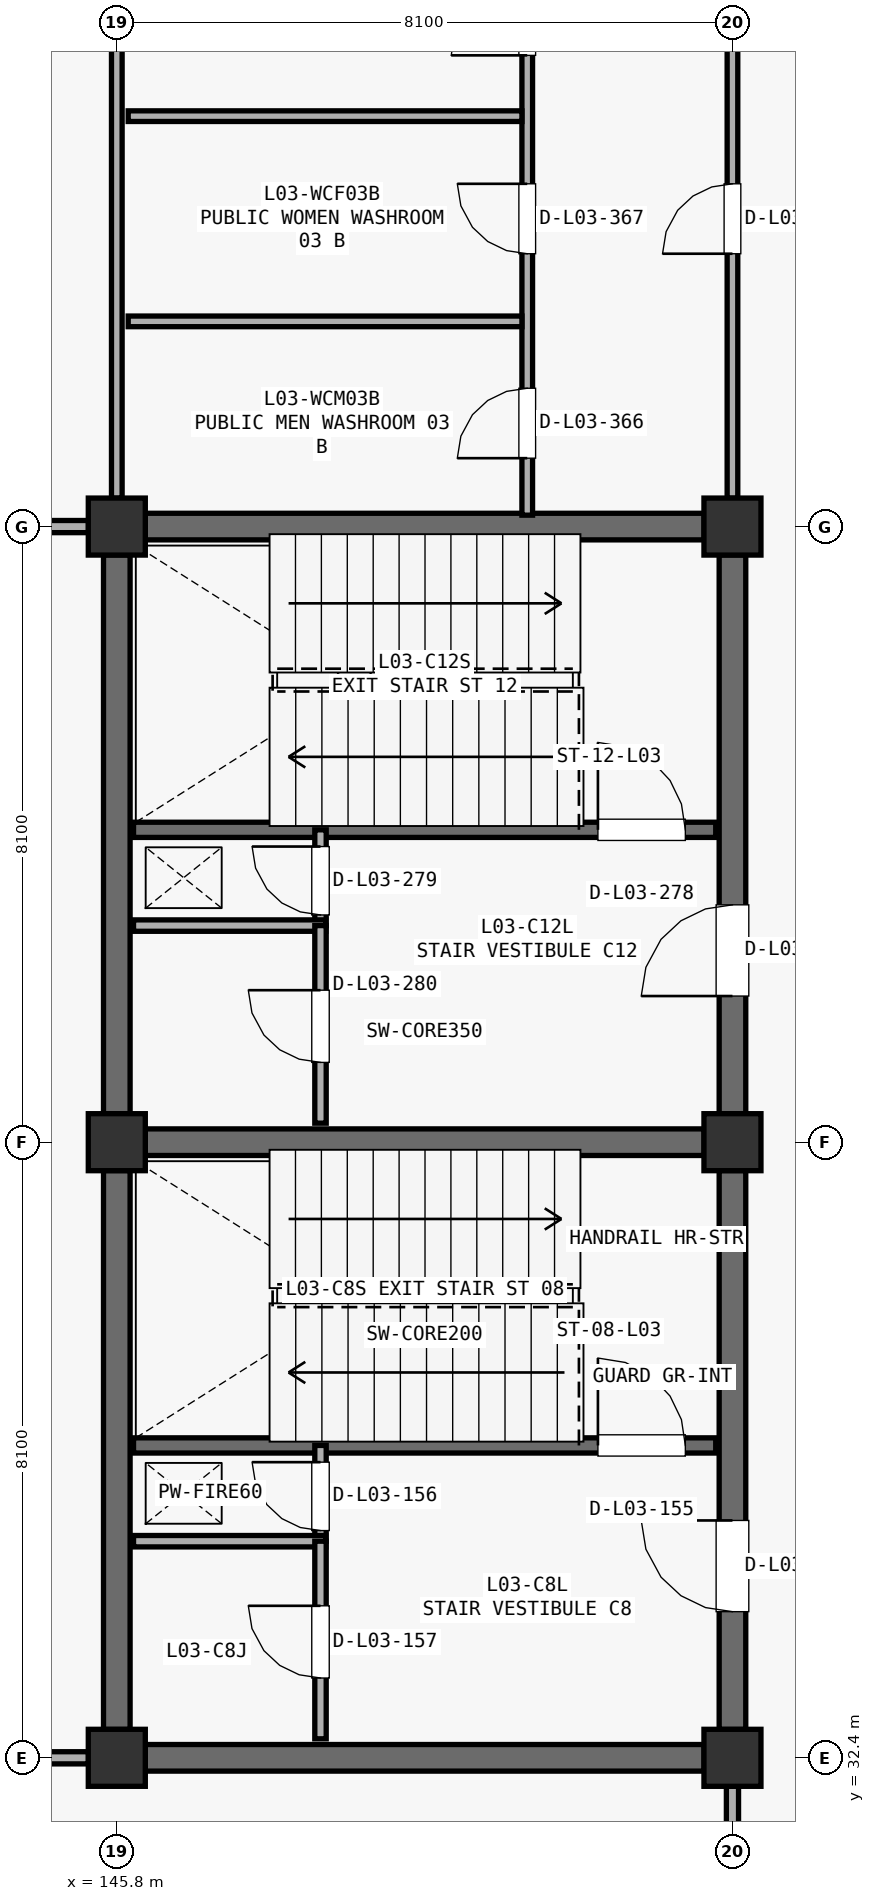
"""IFC4 building model, lengths in metres.
Left out: names, types, materials, properties, quantities, classifications, styles, units other than length and angle.
Written with IfcOpenShell. Run it as: python <this file> out.ifc"""

import sys

from ifc_helpers import new_model, si_unit, direction, frame, frame_2d, origin, origin_2d, place, context, subcontext, project, spatial, rectangle, extrude, element, fill, save


model = new_model("IFC4")
c1 = context("Model", 3, precision=1e-05, world=origin(), true_north=direction((0.0, 1.0)))
c2 = subcontext(c1, "Body", "Model", "MODEL_VIEW")
j1 = project(units=[si_unit("LENGTHUNIT", "METRE"), si_unit("PLANEANGLEUNIT", "RADIAN")], contexts=[c1])
p1 = place(None, origin())
s1 = spatial("IfcSite", under=j1, at=p1, CompositionType="ELEMENT")
p2 = place(p1, origin())
s2 = spatial("IfcBuilding", under=s1, at=p2, CompositionType="ELEMENT")
p3 = place(p2, frame((0.0, 0.0, 14.11)))
s3 = spatial("IfcBuildingStorey", under=s2, at=p3, CompositionType="ELEMENT", Elevation=14.11)
for number, where, z_axis, x_axis in (
    (1, (145.8, 32.4, 0.0), (0.0, 0.0, 1.0), (1.0, 0.0, 0.0)),
    (2, (145.8, 40.5, 0.0), (0.0, 0.0, 1.0), (1.0, 0.0, 0.0)),
    (3, (145.8, 48.6, 0.0), (0.0, 0.0, 1.0), (1.0, 0.0, 0.0)),
    (4, (153.9, 32.4, 0.0), (0.0, 0.0, 1.0), (1.0, 0.0, 0.0)),
    (5, (153.9, 40.5, 0.0), (0.0, 0.0, 1.0), (1.0, 0.0, 0.0)),
    (6, (153.9, 48.6, 0.0), (0.0, 0.0, 1.0), (1.0, 0.0, 0.0)),
):
    element("IfcColumn", number, at=place(p3, frame(where, z_axis=z_axis, x_axis=x_axis)), inside=s3, PredefinedType="COLUMN", context=c2, shape_type="SweptSolid", body=[
        extrude(rectangle(XDim=0.75, YDim=0.75, at=origin_2d()), origin(), (0.0, 0.0, 1.0), 4.42),
    ])
for number, where, z_axis, x_axis in (
    (7, (146.173, 40.5, 0.0), (0.0, 0.0, 1.0), (1.0, 0.0, 0.0)),
    (8, (145.8, 32.773, 0.0), (0.0, 0.0, 1.0), (0.0, 1.0, 0.0)),
):
    element("IfcWall", number, at=place(p3, frame(where, z_axis=z_axis, x_axis=x_axis)), inside=s3, PredefinedType="SHEAR", context=c2, shape_type="SweptSolid", body=[
        extrude(rectangle(XDim=7.354, YDim=0.35, at=frame_2d((3.677, 0.0))), origin(), (0.0, 0.0, 1.0), 4.162),
    ])
p4 = place(p3, frame((153.9, 32.773, 0.0), z_axis=(0.0, 0.0, 1.0), x_axis=(0.0, 1.0, 0.0)))
e9 = element("IfcWall", 9, at=p4, inside=s3, PredefinedType="SHEAR", context=c2, shape_type="SweptSolid", body=[
    extrude(rectangle(XDim=7.354, YDim=0.35, at=frame_2d((3.677, 0.0))), origin(), (0.0, 0.0, 1.0), 4.162),
])
p5 = place(p4, frame((1.55, 0.0, 0.0)))
e10 = element("IfcOpeningElement", 10, at=p5, cuts=e9, PredefinedType="OPENING", context=c2, shape_type="SweptSolid", body=[
    extrude(rectangle(XDim=1.2, YDim=2.2, at=frame_2d((0.6, 1.1))), frame((0.0, 0.185, 0.0), z_axis=(0.0, -1.0, 0.0), x_axis=(1.0, 0.0, 0.0)), (0.0, 0.0, 1.0), 0.37),
])
p6 = place(p3, frame((146.173, 32.4, 0.0), z_axis=(0.0, 0.0, 1.0), x_axis=(1.0, 0.0, 0.0)))
e11 = element("IfcWall", 11, at=p6, inside=s3, PredefinedType="SHEAR", context=c2, shape_type="SweptSolid", body=[
    extrude(rectangle(XDim=7.354, YDim=0.35, at=frame_2d((3.677, 0.0))), origin(), (0.0, 0.0, 1.0), 4.162),
])
p7 = place(p3, frame((146.02, 36.51, 0.0), z_axis=(0.0, 0.0, 1.0), x_axis=(1.0, 0.0, 0.0)))
e12 = element("IfcWall", 12, at=p7, inside=s3, PredefinedType="SHEAR", context=c2, shape_type="SweptSolid", body=[
    extrude(rectangle(XDim=7.66, YDim=0.2, at=frame_2d((3.83, 0.0))), origin(), (0.0, 0.0, 1.0), 4.162),
])
p8 = place(p7, frame((6.11, 0.0, 0.0)))
e13 = element("IfcOpeningElement", 13, at=p8, cuts=e12, PredefinedType="OPENING", context=c2, shape_type="SweptSolid", body=[
    extrude(rectangle(XDim=1.15, YDim=2.2, at=frame_2d((0.575, 1.1))), frame((0.0, 0.11, 0.0), z_axis=(0.0, -1.0, 0.0), x_axis=(1.0, 0.0, 0.0)), (0.0, 0.0, 1.0), 0.22),
])
p9 = place(p3, frame((148.48, 35.25, 0.0), z_axis=(0.0, 0.0, 1.0), x_axis=(0.0, 1.0, 0.0)))
e14 = element("IfcWall", 14, at=p9, inside=s3, PredefinedType="PARTITIONING", context=c2, shape_type="SweptSolid", body=[
    extrude(rectangle(XDim=1.26, YDim=0.15, at=frame_2d((0.63, 0.0))), origin(), (0.0, 0.0, 1.0), 4.162),
])
p10 = place(p9, frame((0.14, 0.0, 0.0)))
e15 = element("IfcOpeningElement", 15, at=p10, cuts=e14, PredefinedType="OPENING", context=c2, shape_type="SweptSolid", body=[
    extrude(rectangle(XDim=0.9, YDim=2.15, at=frame_2d((0.45, 1.075))), frame((0.0, 0.085, 0.0), z_axis=(0.0, -1.0, 0.0), x_axis=(1.0, 0.0, 0.0)), (0.0, 0.0, 1.0), 0.17),
])
p11 = place(p3, frame((146.02, 35.25, 0.0), z_axis=(0.0, 0.0, 1.0), x_axis=(1.0, 0.0, 0.0)))
e16 = element("IfcWall", 16, at=p11, inside=s3, PredefinedType="PARTITIONING", context=c2, shape_type="SweptSolid", body=[
    extrude(rectangle(XDim=2.53, YDim=0.15, at=frame_2d((1.265, 0.0))), origin(), (0.0, 0.0, 1.0), 4.162),
])
p12 = place(p3, frame((148.48, 32.65, 0.0), z_axis=(0.0, 0.0, 1.0), x_axis=(0.0, 1.0, 0.0)))
e17 = element("IfcWall", 17, at=p12, inside=s3, PredefinedType="PARTITIONING", context=c2, shape_type="SweptSolid", body=[
    extrude(rectangle(XDim=2.6, YDim=0.15, at=frame_2d((1.3, 0.0))), origin(), (0.0, 0.0, 1.0), 4.162),
])
p13 = place(p12, frame((0.8, 0.0, 0.0)))
e18 = element("IfcOpeningElement", 18, at=p13, cuts=e17, PredefinedType="OPENING", context=c2, shape_type="SweptSolid", body=[
    extrude(rectangle(XDim=0.95, YDim=2.15, at=frame_2d((0.475, 1.075))), frame((0.0, 0.085, 0.0), z_axis=(0.0, -1.0, 0.0), x_axis=(1.0, 0.0, 0.0)), (0.0, 0.0, 1.0), 0.17),
])
for number, where, z_axis, x_axis in (
    (19, (146.173, 48.6, 0.0), (0.0, 0.0, 1.0), (1.0, 0.0, 0.0)),
    (20, (145.8, 40.873, 0.0), (0.0, 0.0, 1.0), (0.0, 1.0, 0.0)),
):
    element("IfcWall", number, at=place(p3, frame(where, z_axis=z_axis, x_axis=x_axis)), inside=s3, PredefinedType="SHEAR", context=c2, shape_type="SweptSolid", body=[
        extrude(rectangle(XDim=7.354, YDim=0.35, at=frame_2d((3.677, 0.0))), origin(), (0.0, 0.0, 1.0), 4.162),
    ])
p14 = place(p3, frame((153.9, 40.873, 0.0), z_axis=(0.0, 0.0, 1.0), x_axis=(0.0, 1.0, 0.0)))
e21 = element("IfcWall", 21, at=p14, inside=s3, PredefinedType="SHEAR", context=c2, shape_type="SweptSolid", body=[
    extrude(rectangle(XDim=7.354, YDim=0.35, at=frame_2d((3.677, 0.0))), origin(), (0.0, 0.0, 1.0), 4.162),
])
p15 = place(p14, frame((1.55, 0.0, 0.0)))
e22 = element("IfcOpeningElement", 22, at=p15, cuts=e21, PredefinedType="OPENING", context=c2, shape_type="SweptSolid", body=[
    extrude(rectangle(XDim=1.2, YDim=2.2, at=frame_2d((0.6, 1.1))), frame((0.0, 0.185, 0.0), z_axis=(0.0, -1.0, 0.0), x_axis=(1.0, 0.0, 0.0)), (0.0, 0.0, 1.0), 0.37),
])
p16 = place(p3, frame((146.02, 44.61, 0.0), z_axis=(0.0, 0.0, 1.0), x_axis=(1.0, 0.0, 0.0)))
e23 = element("IfcWall", 23, at=p16, inside=s3, PredefinedType="SHEAR", context=c2, shape_type="SweptSolid", body=[
    extrude(rectangle(XDim=7.66, YDim=0.2, at=frame_2d((3.83, 0.0))), origin(), (0.0, 0.0, 1.0), 4.162),
])
p17 = place(p16, frame((6.11, 0.0, 0.0)))
e24 = element("IfcOpeningElement", 24, at=p17, cuts=e23, PredefinedType="OPENING", context=c2, shape_type="SweptSolid", body=[
    extrude(rectangle(XDim=1.15, YDim=2.2, at=frame_2d((0.575, 1.1))), frame((0.0, 0.11, 0.0), z_axis=(0.0, -1.0, 0.0), x_axis=(1.0, 0.0, 0.0)), (0.0, 0.0, 1.0), 0.22),
])
p18 = place(p3, frame((148.48, 43.35, 0.0), z_axis=(0.0, 0.0, 1.0), x_axis=(0.0, 1.0, 0.0)))
e25 = element("IfcWall", 25, at=p18, inside=s3, PredefinedType="PARTITIONING", context=c2, shape_type="SweptSolid", body=[
    extrude(rectangle(XDim=1.26, YDim=0.15, at=frame_2d((0.63, 0.0))), origin(), (0.0, 0.0, 1.0), 4.162),
])
p19 = place(p18, frame((0.14, 0.0, 0.0)))
e26 = element("IfcOpeningElement", 26, at=p19, cuts=e25, PredefinedType="OPENING", context=c2, shape_type="SweptSolid", body=[
    extrude(rectangle(XDim=0.9, YDim=2.15, at=frame_2d((0.45, 1.075))), frame((0.0, 0.085, 0.0), z_axis=(0.0, -1.0, 0.0), x_axis=(1.0, 0.0, 0.0)), (0.0, 0.0, 1.0), 0.17),
])
p20 = place(p3, frame((146.02, 43.35, 0.0), z_axis=(0.0, 0.0, 1.0), x_axis=(1.0, 0.0, 0.0)))
e27 = element("IfcWall", 27, at=p20, inside=s3, PredefinedType="PARTITIONING", context=c2, shape_type="SweptSolid", body=[
    extrude(rectangle(XDim=2.53, YDim=0.15, at=frame_2d((1.265, 0.0))), origin(), (0.0, 0.0, 1.0), 4.162),
])
p21 = place(p3, frame((148.48, 40.75, 0.0), z_axis=(0.0, 0.0, 1.0), x_axis=(0.0, 1.0, 0.0)))
e28 = element("IfcWall", 28, at=p21, inside=s3, PredefinedType="PARTITIONING", context=c2, shape_type="SweptSolid", body=[
    extrude(rectangle(XDim=2.6, YDim=0.15, at=frame_2d((1.3, 0.0))), origin(), (0.0, 0.0, 1.0), 4.162),
])
p22 = place(p21, frame((0.8, 0.0, 0.0)))
e29 = element("IfcOpeningElement", 29, at=p22, cuts=e28, PredefinedType="OPENING", context=c2, shape_type="SweptSolid", body=[
    extrude(rectangle(XDim=0.95, YDim=2.15, at=frame_2d((0.475, 1.075))), frame((0.0, 0.085, 0.0), z_axis=(0.0, -1.0, 0.0), x_axis=(1.0, 0.0, 0.0)), (0.0, 0.0, 1.0), 0.17),
])
p23 = place(p3, frame((145.8, 48.973, 0.0), z_axis=(0.0, 0.0, 1.0), x_axis=(0.0, 1.0, 0.0)))
e30 = element("IfcWall", 30, at=p23, inside=s3, PredefinedType="PARTITIONING", context=c2, shape_type="SweptSolid", body=[
    extrude(rectangle(XDim=7.354, YDim=0.14, at=frame_2d((3.677, 0.0))), origin(), (0.0, 0.0, 1.0), 3.51),
])
p24 = place(p3, frame((153.9, 48.973, 0.0), z_axis=(0.0, 0.0, 1.0), x_axis=(0.0, 1.0, 0.0)))
e31 = element("IfcWall", 31, at=p24, inside=s3, PredefinedType="PARTITIONING", context=c2, shape_type="SweptSolid", body=[
    extrude(rectangle(XDim=7.354, YDim=0.14, at=frame_2d((3.677, 0.0))), origin(), (0.0, 0.0, 1.0), 3.31),
])
p25 = place(p24, frame((3.217, 0.0, 0.0)))
e32 = element("IfcOpeningElement", 32, at=p25, cuts=e31, PredefinedType="OPENING", context=c2, shape_type="SweptSolid", body=[
    extrude(rectangle(XDim=0.92, YDim=2.15, at=frame_2d((0.46, 1.075))), frame((0.0, 0.08, 0.0), z_axis=(0.0, -1.0, 0.0), x_axis=(1.0, 0.0, 0.0)), (0.0, 0.0, 1.0), 0.16),
])
p26 = place(p3, frame((151.2, 48.75, 0.0), z_axis=(0.0, 0.0, 1.0), x_axis=(0.0, 1.0, 0.0)))
e33 = element("IfcWall", 33, at=p26, inside=s3, PredefinedType="PARTITIONING", context=c2, shape_type="SweptSolid", body=[
    extrude(rectangle(XDim=7.8, YDim=0.14, at=frame_2d((3.9, 0.0))), origin(), (0.0, 0.0, 1.0), 4.162),
])
p27 = place(p26, frame((0.75, 0.0, 0.0)))
e34 = element("IfcOpeningElement", 34, at=p27, cuts=e33, PredefinedType="OPENING", context=c2, shape_type="SweptSolid", body=[
    extrude(rectangle(XDim=0.92, YDim=2.15, at=frame_2d((0.46, 1.075))), frame((0.0, 0.08, 0.0), z_axis=(0.0, -1.0, 0.0), x_axis=(1.0, 0.0, 0.0)), (0.0, 0.0, 1.0), 0.16),
])
p28 = place(p26, frame((3.44, 0.0, 0.0)))
e35 = element("IfcOpeningElement", 35, at=p28, cuts=e33, PredefinedType="OPENING", context=c2, shape_type="SweptSolid", body=[
    extrude(rectangle(XDim=0.92, YDim=2.15, at=frame_2d((0.46, 1.075))), frame((0.0, 0.08, 0.0), z_axis=(0.0, -1.0, 0.0), x_axis=(1.0, 0.0, 0.0)), (0.0, 0.0, 1.0), 0.16),
])
p29 = place(p26, frame((6.05, 0.0, 0.0)))
e36 = element("IfcOpeningElement", 36, at=p29, cuts=e33, PredefinedType="OPENING", context=c2, shape_type="SweptSolid", body=[
    extrude(rectangle(XDim=1.0, YDim=2.15, at=frame_2d((0.5, 1.075))), frame((0.0, 0.08, 0.0), z_axis=(0.0, -1.0, 0.0), x_axis=(1.0, 0.0, 0.0)), (0.0, 0.0, 1.0), 0.16),
])
for number, where, z_axis, x_axis in (
    (37, (145.95, 51.3, 0.0), (0.0, 0.0, 1.0), (1.0, 0.0, 0.0)),
    (38, (145.95, 54.0, 0.0), (0.0, 0.0, 1.0), (1.0, 0.0, 0.0)),
):
    element("IfcWall", number, at=place(p3, frame(where, z_axis=z_axis, x_axis=x_axis)), inside=s3, PredefinedType="PARTITIONING", context=c2, shape_type="SweptSolid", body=[
        extrude(rectangle(XDim=5.18, YDim=0.14, at=frame_2d((2.59, 0.0))), origin(), (0.0, 0.0, 1.0), 4.162),
    ])
for number, where, z_axis, x_axis in (
    (39, (153.9, 24.673, 0.0), (0.0, 0.0, 1.0), (0.0, 1.0, 0.0)),
    (40, (138.073, 32.4, 0.0), (0.0, 0.0, 1.0), (1.0, 0.0, 0.0)),
):
    element("IfcWall", number, at=place(p3, frame(where, z_axis=z_axis, x_axis=x_axis)), inside=s3, PredefinedType="PARTITIONING", context=c2, shape_type="SweptSolid", body=[
        extrude(rectangle(XDim=7.354, YDim=0.16, at=frame_2d((3.677, 0.0))), origin(), (0.0, 0.0, 1.0), 3.412),
    ])
p30 = place(p3, frame((138.073, 48.6, 0.0), z_axis=(0.0, 0.0, 1.0), x_axis=(1.0, 0.0, 0.0)))
e41 = element("IfcWall", 41, at=p30, inside=s3, PredefinedType="PARTITIONING", context=c2, shape_type="SweptSolid", body=[
    extrude(rectangle(XDim=7.354, YDim=0.16, at=frame_2d((3.677, 0.0))), origin(), (0.0, 0.0, 1.0), 3.562),
])
p31 = place(p30, frame((2.927, 0.0, 0.0)))
e42 = element("IfcOpeningElement", 42, at=p31, cuts=e41, PredefinedType="OPENING", context=c2, shape_type="SweptSolid", body=[
    extrude(rectangle(XDim=1.5, YDim=2.2, at=frame_2d((0.75, 1.1))), frame((0.0, 0.09, 0.0), z_axis=(0.0, -1.0, 0.0), x_axis=(1.0, 0.0, 0.0)), (0.0, 0.0, 1.0), 0.18),
])
p32 = place(p5, origin())
e43 = element("IfcDoor", 43, at=p32, inside=s3, OperationType="SINGLE_SWING_RIGHT", PredefinedType="DOOR", context=c2, shape_type="SweptSolid", body=[
    extrude(rectangle(XDim=1.2, YDim=2.2, at=frame_2d((0.6, 1.1))), frame((0.0, 0.025, 0.0), z_axis=(0.0, -1.0, 0.0), x_axis=(1.0, 0.0, 0.0)), (0.0, 0.0, 1.0), 0.05),
])
fill(e10, e43)
p33 = place(p8, origin())
e44 = element("IfcDoor", 44, at=p33, inside=s3, OperationType="SINGLE_SWING_LEFT", PredefinedType="DOOR", context=c2, shape_type="SweptSolid", body=[
    extrude(rectangle(XDim=1.15, YDim=2.2, at=frame_2d((0.575, 1.1))), frame((0.0, 0.025, 0.0), z_axis=(0.0, -1.0, 0.0), x_axis=(1.0, 0.0, 0.0)), (0.0, 0.0, 1.0), 0.05),
])
fill(e13, e44)
p34 = place(p10, origin())
e45 = element("IfcDoor", 45, at=p34, inside=s3, OperationType="SINGLE_SWING_RIGHT", PredefinedType="DOOR", context=c2, shape_type="SweptSolid", body=[
    extrude(rectangle(XDim=0.9, YDim=2.15, at=frame_2d((0.45, 1.075))), frame((0.0, 0.025, 0.0), z_axis=(0.0, -1.0, 0.0), x_axis=(1.0, 0.0, 0.0)), (0.0, 0.0, 1.0), 0.05),
])
fill(e15, e45)
p35 = place(p13, origin())
e46 = element("IfcDoor", 46, at=p35, inside=s3, OperationType="SINGLE_SWING_RIGHT", PredefinedType="DOOR", context=c2, shape_type="SweptSolid", body=[
    extrude(rectangle(XDim=0.95, YDim=2.15, at=frame_2d((0.475, 1.075))), frame((0.0, 0.025, 0.0), z_axis=(0.0, -1.0, 0.0), x_axis=(1.0, 0.0, 0.0)), (0.0, 0.0, 1.0), 0.05),
])
fill(e18, e46)
p36 = place(p15, origin())
e47 = element("IfcDoor", 47, at=p36, inside=s3, OperationType="SINGLE_SWING_LEFT", PredefinedType="DOOR", context=c2, shape_type="SweptSolid", body=[
    extrude(rectangle(XDim=1.2, YDim=2.2, at=frame_2d((0.6, 1.1))), frame((0.0, 0.025, 0.0), z_axis=(0.0, -1.0, 0.0), x_axis=(1.0, 0.0, 0.0)), (0.0, 0.0, 1.0), 0.05),
])
fill(e22, e47)
p37 = place(p17, origin())
e48 = element("IfcDoor", 48, at=p37, inside=s3, OperationType="SINGLE_SWING_LEFT", PredefinedType="DOOR", context=c2, shape_type="SweptSolid", body=[
    extrude(rectangle(XDim=1.15, YDim=2.2, at=frame_2d((0.575, 1.1))), frame((0.0, 0.025, 0.0), z_axis=(0.0, -1.0, 0.0), x_axis=(1.0, 0.0, 0.0)), (0.0, 0.0, 1.0), 0.05),
])
fill(e24, e48)
p38 = place(p19, origin())
e49 = element("IfcDoor", 49, at=p38, inside=s3, OperationType="SINGLE_SWING_RIGHT", PredefinedType="DOOR", context=c2, shape_type="SweptSolid", body=[
    extrude(rectangle(XDim=0.9, YDim=2.15, at=frame_2d((0.45, 1.075))), frame((0.0, 0.025, 0.0), z_axis=(0.0, -1.0, 0.0), x_axis=(1.0, 0.0, 0.0)), (0.0, 0.0, 1.0), 0.05),
])
fill(e26, e49)
p39 = place(p22, origin())
e50 = element("IfcDoor", 50, at=p39, inside=s3, OperationType="SINGLE_SWING_RIGHT", PredefinedType="DOOR", context=c2, shape_type="SweptSolid", body=[
    extrude(rectangle(XDim=0.95, YDim=2.15, at=frame_2d((0.475, 1.075))), frame((0.0, 0.025, 0.0), z_axis=(0.0, -1.0, 0.0), x_axis=(1.0, 0.0, 0.0)), (0.0, 0.0, 1.0), 0.05),
])
fill(e29, e50)
p40 = place(p25, origin())
e51 = element("IfcDoor", 51, at=p40, inside=s3, OperationType="SINGLE_SWING_LEFT", PredefinedType="DOOR", context=c2, shape_type="SweptSolid", body=[
    extrude(rectangle(XDim=0.92, YDim=2.15, at=frame_2d((0.46, 1.075))), frame((0.0, 0.025, 0.0), z_axis=(0.0, -1.0, 0.0), x_axis=(1.0, 0.0, 0.0)), (0.0, 0.0, 1.0), 0.05),
])
fill(e32, e51)
p41 = place(p27, origin())
e52 = element("IfcDoor", 52, at=p41, inside=s3, OperationType="SINGLE_SWING_LEFT", PredefinedType="DOOR", context=c2, shape_type="SweptSolid", body=[
    extrude(rectangle(XDim=0.92, YDim=2.15, at=frame_2d((0.46, 1.075))), frame((0.0, 0.025, 0.0), z_axis=(0.0, -1.0, 0.0), x_axis=(1.0, 0.0, 0.0)), (0.0, 0.0, 1.0), 0.05),
])
fill(e34, e52)
p42 = place(p28, origin())
e53 = element("IfcDoor", 53, at=p42, inside=s3, OperationType="SINGLE_SWING_RIGHT", PredefinedType="DOOR", context=c2, shape_type="SweptSolid", body=[
    extrude(rectangle(XDim=0.92, YDim=2.15, at=frame_2d((0.46, 1.075))), frame((0.0, 0.025, 0.0), z_axis=(0.0, -1.0, 0.0), x_axis=(1.0, 0.0, 0.0)), (0.0, 0.0, 1.0), 0.05),
])
fill(e35, e53)
p43 = place(p29, origin())
e54 = element("IfcDoor", 54, at=p43, inside=s3, OperationType="SINGLE_SWING_LEFT", PredefinedType="DOOR", context=c2, shape_type="SweptSolid", body=[
    extrude(rectangle(XDim=1.0, YDim=2.15, at=frame_2d((0.5, 1.075))), frame((0.0, 0.025, 0.0), z_axis=(0.0, -1.0, 0.0), x_axis=(1.0, 0.0, 0.0)), (0.0, 0.0, 1.0), 0.05),
])
fill(e36, e54)
save(model, sys.argv[1])
